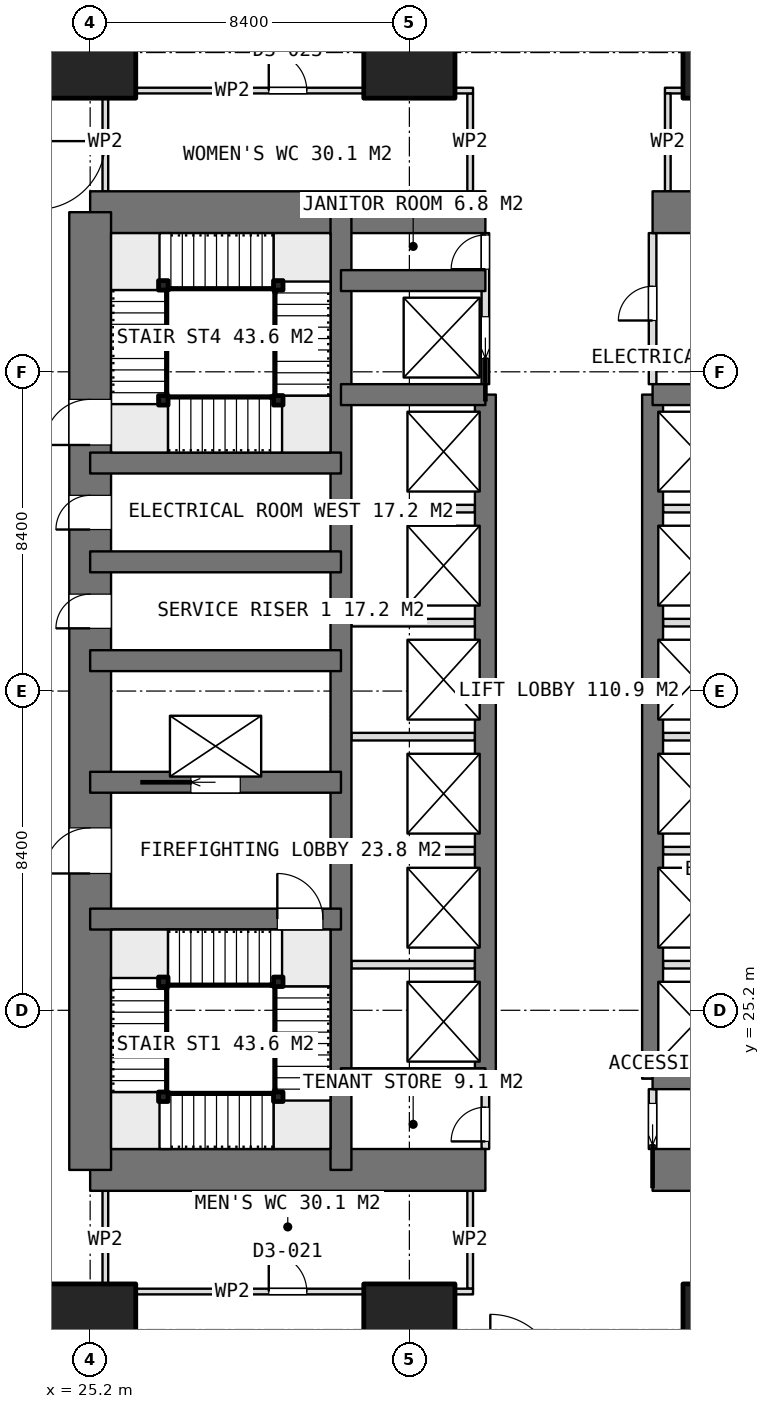
"""IFC4 building model, lengths in metres.
Left out: names, types, materials, properties, quantities, classifications, styles, units other than length and angle.
Written with IfcOpenShell. Run it as: python <this file> out.ifc"""

import sys

from ifc_helpers import new_model, si_unit, direction, frame, frame_2d, origin, origin_2d, place, context, subcontext, project, spatial, rectangle, extrude, element, fill, save


model = new_model("IFC4")
c1 = context("Model", 3, precision=1e-05, world=origin(), true_north=direction((0.0, 1.0)))
c2 = subcontext(c1, "Body", "Model", "MODEL_VIEW")
j1 = project(units=[si_unit("LENGTHUNIT", "METRE"), si_unit("PLANEANGLEUNIT", "RADIAN")], contexts=[c1])
p1 = place(None, origin())
s1 = spatial("IfcSite", under=j1, at=p1, CompositionType="ELEMENT")
p2 = place(p1, origin())
s2 = spatial("IfcBuilding", under=s1, at=p2, CompositionType="ELEMENT")
p3 = place(p2, frame((0.0, 0.0, 15.4)))
s3 = spatial("IfcBuildingStorey", under=s2, at=p3, CompositionType="ELEMENT", Elevation=15.4)
p4 = place(p3, frame((25.2, 21.0, 0.0), z_axis=(0.0, 0.0, 1.0), x_axis=(1.0, 0.0, 0.0)))
e1 = element("IfcWall", 1, at=p4, inside=s3, PredefinedType="SHEAR", context=c2, shape_type="SweptSolid", body=[
    extrude(rectangle(XDim=10.4, YDim=1.1, at=frame_2d((5.2, 0.0))), origin(), (0.0, 0.0, 1.0), 5.0),
])
p5 = place(p3, frame((40.0, 21.0, 0.0), z_axis=(0.0, 0.0, 1.0), x_axis=(1.0, 0.0, 0.0)))
e2 = element("IfcWall", 2, at=p5, inside=s3, PredefinedType="SHEAR", context=c2, shape_type="SweptSolid", body=[
    extrude(rectangle(XDim=10.4, YDim=1.1, at=frame_2d((5.2, 0.0))), origin(), (0.0, 0.0, 1.0), 5.0),
])
p6 = place(p3, frame((25.2, 46.2, 0.0), z_axis=(0.0, 0.0, 1.0), x_axis=(1.0, 0.0, 0.0)))
e3 = element("IfcWall", 3, at=p6, inside=s3, PredefinedType="SHEAR", context=c2, shape_type="SweptSolid", body=[
    extrude(rectangle(XDim=10.4, YDim=1.1, at=frame_2d((5.2, 0.0))), origin(), (0.0, 0.0, 1.0), 5.0),
])
p7 = place(p3, frame((40.0, 46.2, 0.0), z_axis=(0.0, 0.0, 1.0), x_axis=(1.0, 0.0, 0.0)))
e4 = element("IfcWall", 4, at=p7, inside=s3, PredefinedType="SHEAR", context=c2, shape_type="SweptSolid", body=[
    extrude(rectangle(XDim=10.4, YDim=1.1, at=frame_2d((5.2, 0.0))), origin(), (0.0, 0.0, 1.0), 5.0),
])
p8 = place(p3, frame((25.2, 21.0, 0.0), z_axis=(0.0, 0.0, 1.0), x_axis=(0.0, 1.0, 0.0)))
e5 = element("IfcWall", 5, at=p8, inside=s3, PredefinedType="SHEAR", context=c2, shape_type="SweptSolid", body=[
    extrude(rectangle(XDim=25.2, YDim=1.1, at=frame_2d((12.6, 0.0))), origin(), (0.0, 0.0, 1.0), 5.0),
])
p9 = place(p8, frame((7.8, 0.0, 0.0)))
e6 = element("IfcOpeningElement", 6, at=p9, cuts=e5, PredefinedType="OPENING", context=c2, shape_type="SweptSolid", body=[
    extrude(rectangle(XDim=1.2, YDim=2.1, at=frame_2d((0.6, 1.05))), frame((0.0, 0.56, 0.0), z_axis=(0.0, -1.0, 0.0), x_axis=(1.0, 0.0, 0.0)), (0.0, 0.0, 1.0), 1.12),
])
p10 = place(p8, frame((14.25, 0.0, 0.0)))
e7 = element("IfcOpeningElement", 7, at=p10, cuts=e5, PredefinedType="OPENING", context=c2, shape_type="SweptSolid", body=[
    extrude(rectangle(XDim=0.9, YDim=2.1, at=frame_2d((0.45, 1.05))), frame((0.0, 0.56, 0.0), z_axis=(0.0, -1.0, 0.0), x_axis=(1.0, 0.0, 0.0)), (0.0, 0.0, 1.0), 1.12),
])
p11 = place(p8, frame((16.85, 0.0, 0.0)))
e8 = element("IfcOpeningElement", 8, at=p11, cuts=e5, PredefinedType="OPENING", context=c2, shape_type="SweptSolid", body=[
    extrude(rectangle(XDim=0.9, YDim=2.1, at=frame_2d((0.45, 1.05))), frame((0.0, 0.56, 0.0), z_axis=(0.0, -1.0, 0.0), x_axis=(1.0, 0.0, 0.0)), (0.0, 0.0, 1.0), 1.12),
])
p12 = place(p8, frame((19.075, 0.0, 0.0)))
e9 = element("IfcOpeningElement", 9, at=p12, cuts=e5, PredefinedType="OPENING", context=c2, shape_type="SweptSolid", body=[
    extrude(rectangle(XDim=1.2, YDim=2.1, at=frame_2d((0.6, 1.05))), frame((0.0, 0.56, 0.0), z_axis=(0.0, -1.0, 0.0), x_axis=(1.0, 0.0, 0.0)), (0.0, 0.0, 1.0), 1.12),
])
p13 = place(p3, frame((31.8, 21.0, 0.0), z_axis=(0.0, 0.0, 1.0), x_axis=(0.0, 1.0, 0.0)))
e10 = element("IfcWall", 10, at=p13, inside=s3, PredefinedType="SHEAR", context=c2, shape_type="SweptSolid", body=[
    extrude(rectangle(XDim=25.2, YDim=0.55, at=frame_2d((12.6, 0.0))), origin(), (0.0, 0.0, 1.0), 5.0),
])
for number, where, z_axis, x_axis in (
    (11, (35.6, 23.4, 0.0), (0.0, 0.0, 1.0), (0.0, 1.0, 0.0)),
    (12, (40.0, 23.4, 0.0), (0.0, 0.0, 1.0), (0.0, 1.0, 0.0)),
):
    element("IfcWall", number, at=place(p3, frame(where, z_axis=z_axis, x_axis=x_axis)), inside=s3, PredefinedType="SHEAR", context=c2, shape_type="SweptSolid", body=[
        extrude(rectangle(XDim=18.0, YDim=0.55, at=frame_2d((9.0, 0.0))), origin(), (0.0, 0.0, 1.0), 5.0),
    ])
for number, where, z_axis, x_axis in (
    (13, (31.8, 23.4, 0.0), (0.0, 0.0, 1.0), (1.0, 0.0, 0.0)),
    (14, (31.8, 41.4, 0.0), (0.0, 0.0, 1.0), (1.0, 0.0, 0.0)),
    (15, (31.8, 44.4, 0.0), (0.0, 0.0, 1.0), (1.0, 0.0, 0.0)),
    (16, (40.0, 23.4, 0.0), (0.0, 0.0, 1.0), (1.0, 0.0, 0.0)),
    (17, (40.0, 41.4, 0.0), (0.0, 0.0, 1.0), (1.0, 0.0, 0.0)),
):
    element("IfcWall", number, at=place(p3, frame(where, z_axis=z_axis, x_axis=x_axis)), inside=s3, PredefinedType="SHEAR", context=c2, shape_type="SweptSolid", body=[
        extrude(rectangle(XDim=3.8, YDim=0.55, at=frame_2d((1.9, 0.0))), origin(), (0.0, 0.0, 1.0), 5.0),
    ])
p14 = place(p3, frame((25.2, 27.6, 0.0), z_axis=(0.0, 0.0, 1.0), x_axis=(1.0, 0.0, 0.0)))
e18 = element("IfcWall", 18, at=p14, inside=s3, PredefinedType="SHEAR", context=c2, shape_type="SweptSolid", body=[
    extrude(rectangle(XDim=6.6, YDim=0.55, at=frame_2d((3.3, 0.0))), origin(), (0.0, 0.0, 1.0), 5.0),
])
p15 = place(p14, frame((4.925, 0.0, 0.0)))
e19 = element("IfcOpeningElement", 19, at=p15, cuts=e18, PredefinedType="OPENING", context=c2, shape_type="SweptSolid", body=[
    extrude(rectangle(XDim=1.2, YDim=2.1, at=frame_2d((0.6, 1.05))), frame((0.0, 0.285, 0.0), z_axis=(0.0, -1.0, 0.0), x_axis=(1.0, 0.0, 0.0)), (0.0, 0.0, 1.0), 0.57),
])
p16 = place(p3, frame((25.2, 31.2, 0.0), z_axis=(0.0, 0.0, 1.0), x_axis=(1.0, 0.0, 0.0)))
e20 = element("IfcWall", 20, at=p16, inside=s3, PredefinedType="SHEAR", context=c2, shape_type="SweptSolid", body=[
    extrude(rectangle(XDim=6.6, YDim=0.55, at=frame_2d((3.3, 0.0))), origin(), (0.0, 0.0, 1.0), 5.0),
])
p17 = place(p16, frame((2.65, 0.0, 0.0)))
e21 = element("IfcOpeningElement", 21, at=p17, cuts=e20, PredefinedType="OPENING", context=c2, shape_type="SweptSolid", body=[
    extrude(rectangle(XDim=1.3, YDim=2.1, at=frame_2d((0.65, 1.05))), frame((0.0, 0.285, 0.0), z_axis=(0.0, -1.0, 0.0), x_axis=(1.0, 0.0, 0.0)), (0.0, 0.0, 1.0), 0.57),
])
for number, where, z_axis, x_axis in (
    (22, (25.2, 34.4, 0.0), (0.0, 0.0, 1.0), (1.0, 0.0, 0.0)),
    (23, (25.2, 37.0, 0.0), (0.0, 0.0, 1.0), (1.0, 0.0, 0.0)),
    (24, (25.2, 39.6, 0.0), (0.0, 0.0, 1.0), (1.0, 0.0, 0.0)),
):
    element("IfcWall", number, at=place(p3, frame(where, z_axis=z_axis, x_axis=x_axis)), inside=s3, PredefinedType="SHEAR", context=c2, shape_type="SweptSolid", body=[
        extrude(rectangle(XDim=6.6, YDim=0.55, at=frame_2d((3.3, 0.0))), origin(), (0.0, 0.0, 1.0), 5.0),
    ])
for number, where, z_axis, x_axis in (
    (25, (25.2, 16.8, 0.0), (0.0, 0.0, 1.0), (1.0, 0.0, 0.0)),
    (26, (25.2, 50.4, 0.0), (0.0, 0.0, 1.0), (1.0, 0.0, 0.0)),
    (27, (33.6, 16.8, 0.0), (0.0, 0.0, 1.0), (1.0, 0.0, 0.0)),
    (28, (33.6, 50.4, 0.0), (0.0, 0.0, 1.0), (1.0, 0.0, 0.0)),
    (29, (42.0, 16.8, 0.0), (0.0, 0.0, 1.0), (1.0, 0.0, 0.0)),
    (30, (42.0, 50.4, 0.0), (0.0, 0.0, 1.0), (1.0, 0.0, 0.0)),
):
    element("IfcColumn", number, at=place(p3, frame(where, z_axis=z_axis, x_axis=x_axis)), inside=s3, PredefinedType="COLUMN", context=c2, shape_type="SweptSolid", body=[
        extrude(rectangle(XDim=2.4, YDim=2.4, at=origin_2d()), origin(), (0.0, 0.0, 1.0), 5.0),
    ])
for number, where, z_axis, x_axis in (
    (31, (32.075, 26.4, 0.0), (0.0, 0.0, 1.0), (1.0, 0.0, 0.0)),
    (32, (32.075, 29.4, 0.0), (0.0, 0.0, 1.0), (1.0, 0.0, 0.0)),
    (33, (32.075, 32.4, 0.0), (0.0, 0.0, 1.0), (1.0, 0.0, 0.0)),
    (34, (32.075, 35.4, 0.0), (0.0, 0.0, 1.0), (1.0, 0.0, 0.0)),
    (35, (32.075, 38.4, 0.0), (0.0, 0.0, 1.0), (1.0, 0.0, 0.0)),
    (36, (40.275, 26.4, 0.0), (0.0, 0.0, 1.0), (1.0, 0.0, 0.0)),
    (37, (40.275, 29.4, 0.0), (0.0, 0.0, 1.0), (1.0, 0.0, 0.0)),
    (38, (40.275, 32.4, 0.0), (0.0, 0.0, 1.0), (1.0, 0.0, 0.0)),
    (39, (40.275, 35.4, 0.0), (0.0, 0.0, 1.0), (1.0, 0.0, 0.0)),
    (40, (40.275, 38.4, 0.0), (0.0, 0.0, 1.0), (1.0, 0.0, 0.0)),
):
    element("IfcWall", number, at=place(p3, frame(where, z_axis=z_axis, x_axis=x_axis)), inside=s3, PredefinedType="PARTITIONING", context=c2, shape_type="SweptSolid", body=[
        extrude(rectangle(XDim=3.25, YDim=0.2, at=frame_2d((1.625, 0.0))), origin(), (0.0, 0.0, 1.0), 4.7),
    ])
p18 = place(p3, frame((40.0, 21.55, 0.0), z_axis=(0.0, 0.0, 1.0), x_axis=(0.0, 1.0, 0.0)))
e41 = element("IfcWall", 41, at=p18, inside=s3, PredefinedType="PARTITIONING", context=c2, shape_type="SweptSolid", body=[
    extrude(rectangle(XDim=1.575, YDim=0.2, at=frame_2d((0.788, 0.0))), origin(), (0.0, 0.0, 1.0), 4.7),
])
p19 = place(p18, frame((0.1, 0.0, 0.0)))
e42 = element("IfcOpeningElement", 42, at=p19, cuts=e41, PredefinedType="OPENING", context=c2, shape_type="SweptSolid", body=[
    extrude(rectangle(XDim=1.1, YDim=2.1, at=frame_2d((0.55, 1.05))), frame((0.0, 0.11, 0.0), z_axis=(0.0, -1.0, 0.0), x_axis=(1.0, 0.0, 0.0)), (0.0, 0.0, 1.0), 0.22),
])
p20 = place(p3, frame((40.0, 41.675, 0.0), z_axis=(0.0, 0.0, 1.0), x_axis=(0.0, 1.0, 0.0)))
e43 = element("IfcWall", 43, at=p20, inside=s3, PredefinedType="PARTITIONING", context=c2, shape_type="SweptSolid", body=[
    extrude(rectangle(XDim=3.975, YDim=0.2, at=frame_2d((1.987, 0.0))), origin(), (0.0, 0.0, 1.0), 4.7),
])
p21 = place(p20, frame((1.675, 0.0, 0.0)))
e44 = element("IfcOpeningElement", 44, at=p21, cuts=e43, PredefinedType="OPENING", context=c2, shape_type="SweptSolid", body=[
    extrude(rectangle(XDim=0.9, YDim=2.1, at=frame_2d((0.45, 1.05))), frame((0.0, 0.11, 0.0), z_axis=(0.0, -1.0, 0.0), x_axis=(1.0, 0.0, 0.0)), (0.0, 0.0, 1.0), 0.22),
])
p22 = place(p3, frame((35.6, 41.675, 0.0), z_axis=(0.0, 0.0, 1.0), x_axis=(0.0, 1.0, 0.0)))
e45 = element("IfcWall", 45, at=p22, inside=s3, PredefinedType="PARTITIONING", context=c2, shape_type="SweptSolid", body=[
    extrude(rectangle(XDim=3.975, YDim=0.2, at=frame_2d((1.987, 0.0))), origin(), (0.0, 0.0, 1.0), 4.7),
])
p23 = place(p22, frame((3.025, 0.0, 0.0)))
e46 = element("IfcOpeningElement", 46, at=p23, cuts=e45, PredefinedType="OPENING", context=c2, shape_type="SweptSolid", body=[
    extrude(rectangle(XDim=0.9, YDim=2.1, at=frame_2d((0.45, 1.05))), frame((0.0, 0.11, 0.0), z_axis=(0.0, -1.0, 0.0), x_axis=(1.0, 0.0, 0.0)), (0.0, 0.0, 1.0), 0.22),
])
p24 = place(p22, frame((0.675, 0.0, 0.0)))
e47 = element("IfcOpeningElement", 47, at=p24, cuts=e45, PredefinedType="OPENING", context=c2, shape_type="SweptSolid", body=[
    extrude(rectangle(XDim=1.1, YDim=2.1, at=frame_2d((0.55, 1.05))), frame((0.0, 0.11, 0.0), z_axis=(0.0, -1.0, 0.0), x_axis=(1.0, 0.0, 0.0)), (0.0, 0.0, 1.0), 0.22),
])
p25 = place(p3, frame((35.6, 21.55, 0.0), z_axis=(0.0, 0.0, 1.0), x_axis=(0.0, 1.0, 0.0)))
e48 = element("IfcWall", 48, at=p25, inside=s3, PredefinedType="PARTITIONING", context=c2, shape_type="SweptSolid", body=[
    extrude(rectangle(XDim=1.575, YDim=0.2, at=frame_2d((0.788, 0.0))), origin(), (0.0, 0.0, 1.0), 4.7),
])
p26 = place(p25, frame((0.2, 0.0, 0.0)))
e49 = element("IfcOpeningElement", 49, at=p26, cuts=e48, PredefinedType="OPENING", context=c2, shape_type="SweptSolid", body=[
    extrude(rectangle(XDim=0.9, YDim=2.1, at=frame_2d((0.45, 1.05))), frame((0.0, 0.11, 0.0), z_axis=(0.0, -1.0, 0.0), x_axis=(1.0, 0.0, 0.0)), (0.0, 0.0, 1.0), 0.22),
])
p27 = place(p3, frame((40.325, 49.4, 0.0), z_axis=(0.0, 0.0, 1.0), x_axis=(1.0, 0.0, 0.0)))
e50 = element("IfcWall", 50, at=p27, inside=s3, PredefinedType="PARTITIONING", context=c2, shape_type="SweptSolid", body=[
    extrude(rectangle(XDim=9.75, YDim=0.15, at=frame_2d((4.875, 0.0))), origin(), (0.0, 0.0, 1.0), 4.7),
])
p28 = place(p27, frame((4.375, 0.0, 0.0)))
e51 = element("IfcOpeningElement", 51, at=p28, cuts=e50, PredefinedType="OPENING", context=c2, shape_type="SweptSolid", body=[
    extrude(rectangle(XDim=1.0, YDim=2.1, at=frame_2d((0.5, 1.05))), frame((0.0, 0.085, 0.0), z_axis=(0.0, -1.0, 0.0), x_axis=(1.0, 0.0, 0.0)), (0.0, 0.0, 1.0), 0.17),
])
p29 = place(p3, frame((40.4, 46.75, 0.0), z_axis=(0.0, 0.0, 1.0), x_axis=(0.0, 1.0, 0.0)))
e52 = element("IfcWall", 52, at=p29, inside=s3, PredefinedType="PARTITIONING", context=c2, shape_type="SweptSolid", body=[
    extrude(rectangle(XDim=2.575, YDim=0.15, at=frame_2d((1.288, 0.0))), origin(), (0.0, 0.0, 1.0), 4.7),
])
p30 = place(p3, frame((25.525, 49.4, 0.0), z_axis=(0.0, 0.0, 1.0), x_axis=(1.0, 0.0, 0.0)))
e53 = element("IfcWall", 53, at=p30, inside=s3, PredefinedType="PARTITIONING", context=c2, shape_type="SweptSolid", body=[
    extrude(rectangle(XDim=9.75, YDim=0.15, at=frame_2d((4.875, 0.0))), origin(), (0.0, 0.0, 1.0), 4.7),
])
p31 = place(p30, frame((4.375, 0.0, 0.0)))
e54 = element("IfcOpeningElement", 54, at=p31, cuts=e53, PredefinedType="OPENING", context=c2, shape_type="SweptSolid", body=[
    extrude(rectangle(XDim=1.0, YDim=2.1, at=frame_2d((0.5, 1.05))), frame((0.0, 0.085, 0.0), z_axis=(0.0, -1.0, 0.0), x_axis=(1.0, 0.0, 0.0)), (0.0, 0.0, 1.0), 0.17),
])
for number, where, z_axis, x_axis in (
    (55, (25.6, 46.75, 0.0), (0.0, 0.0, 1.0), (0.0, 1.0, 0.0)),
    (56, (35.2, 46.75, 0.0), (0.0, 0.0, 1.0), (0.0, 1.0, 0.0)),
):
    element("IfcWall", number, at=place(p3, frame(where, z_axis=z_axis, x_axis=x_axis)), inside=s3, PredefinedType="PARTITIONING", context=c2, shape_type="SweptSolid", body=[
        extrude(rectangle(XDim=2.575, YDim=0.15, at=frame_2d((1.288, 0.0))), origin(), (0.0, 0.0, 1.0), 4.7),
    ])
p32 = place(p3, frame((25.525, 17.8, 0.0), z_axis=(0.0, 0.0, 1.0), x_axis=(1.0, 0.0, 0.0)))
e57 = element("IfcWall", 57, at=p32, inside=s3, PredefinedType="PARTITIONING", context=c2, shape_type="SweptSolid", body=[
    extrude(rectangle(XDim=9.75, YDim=0.15, at=frame_2d((4.875, 0.0))), origin(), (0.0, 0.0, 1.0), 4.7),
])
p33 = place(p32, frame((4.375, 0.0, 0.0)))
e58 = element("IfcOpeningElement", 58, at=p33, cuts=e57, PredefinedType="OPENING", context=c2, shape_type="SweptSolid", body=[
    extrude(rectangle(XDim=1.0, YDim=2.1, at=frame_2d((0.5, 1.05))), frame((0.0, 0.085, 0.0), z_axis=(0.0, -1.0, 0.0), x_axis=(1.0, 0.0, 0.0)), (0.0, 0.0, 1.0), 0.17),
])
for number, where, z_axis, x_axis in (
    (59, (25.6, 17.875, 0.0), (0.0, 0.0, 1.0), (0.0, 1.0, 0.0)),
    (60, (35.2, 17.875, 0.0), (0.0, 0.0, 1.0), (0.0, 1.0, 0.0)),
):
    element("IfcWall", number, at=place(p3, frame(where, z_axis=z_axis, x_axis=x_axis)), inside=s3, PredefinedType="PARTITIONING", context=c2, shape_type="SweptSolid", body=[
        extrude(rectangle(XDim=2.575, YDim=0.15, at=frame_2d((1.288, 0.0))), origin(), (0.0, 0.0, 1.0), 4.7),
    ])
for number, where, z_axis, x_axis in (
    (61, (30.15, 25.95, 0.0), (0.0, 0.0, 1.0), (1.0, 0.0, 0.0)),
    (62, (30.15, 22.925, 0.0), (0.0, 0.0, 1.0), (1.0, 0.0, 0.0)),
    (63, (27.125, 22.925, 0.0), (0.0, 0.0, 1.0), (1.0, 0.0, 0.0)),
    (64, (27.125, 25.95, 0.0), (0.0, 0.0, 1.0), (1.0, 0.0, 0.0)),
    (65, (27.125, 41.25, 0.0), (0.0, 0.0, 1.0), (1.0, 0.0, 0.0)),
    (66, (30.15, 41.25, 0.0), (0.0, 0.0, 1.0), (1.0, 0.0, 0.0)),
    (67, (30.15, 44.275, 0.0), (0.0, 0.0, 1.0), (1.0, 0.0, 0.0)),
    (68, (27.125, 44.275, 0.0), (0.0, 0.0, 1.0), (1.0, 0.0, 0.0)),
):
    element("IfcColumn", number, at=place(p3, frame(where, z_axis=z_axis, x_axis=x_axis)), inside=s3, PredefinedType="COLUMN", context=c2, shape_type="SweptSolid", body=[
        extrude(rectangle(XDim=0.25, YDim=0.25, at=origin_2d()), origin(), (0.0, 0.0, 1.0), 5.0),
    ])
p34 = place(p9, origin())
e69 = element("IfcDoor", 69, at=p34, inside=s3, OperationType="SINGLE_SWING_LEFT", PredefinedType="DOOR", context=c2, shape_type="SweptSolid", body=[
    extrude(rectangle(XDim=1.2, YDim=2.1, at=frame_2d((0.6, 1.05))), frame((0.0, 0.025, 0.0), z_axis=(0.0, -1.0, 0.0), x_axis=(1.0, 0.0, 0.0)), (0.0, 0.0, 1.0), 0.05),
])
fill(e6, e69)
p35 = place(p10, origin())
e70 = element("IfcDoor", 70, at=p35, inside=s3, OperationType="SINGLE_SWING_LEFT", PredefinedType="DOOR", context=c2, shape_type="SweptSolid", body=[
    extrude(rectangle(XDim=0.9, YDim=2.1, at=frame_2d((0.45, 1.05))), frame((0.0, 0.025, 0.0), z_axis=(0.0, -1.0, 0.0), x_axis=(1.0, 0.0, 0.0)), (0.0, 0.0, 1.0), 0.05),
])
fill(e7, e70)
p36 = place(p11, origin())
e71 = element("IfcDoor", 71, at=p36, inside=s3, OperationType="SINGLE_SWING_LEFT", PredefinedType="DOOR", context=c2, shape_type="SweptSolid", body=[
    extrude(rectangle(XDim=0.9, YDim=2.1, at=frame_2d((0.45, 1.05))), frame((0.0, 0.025, 0.0), z_axis=(0.0, -1.0, 0.0), x_axis=(1.0, 0.0, 0.0)), (0.0, 0.0, 1.0), 0.05),
])
fill(e8, e71)
p37 = place(p19, origin())
e72 = element("IfcDoor", 72, at=p37, inside=s3, OperationType="SLIDING_TO_LEFT", PredefinedType="DOOR", context=c2, shape_type="SweptSolid", body=[
    extrude(rectangle(XDim=1.1, YDim=2.1, at=frame_2d((0.55, 1.05))), frame((0.0, 0.025, 0.0), z_axis=(0.0, -1.0, 0.0), x_axis=(1.0, 0.0, 0.0)), (0.0, 0.0, 1.0), 0.05),
])
fill(e42, e72)
p38 = place(p26, origin())
e73 = element("IfcDoor", 73, at=p38, inside=s3, OperationType="SINGLE_SWING_LEFT", PredefinedType="DOOR", context=c2, shape_type="SweptSolid", body=[
    extrude(rectangle(XDim=0.9, YDim=2.1, at=frame_2d((0.45, 1.05))), frame((0.0, 0.025, 0.0), z_axis=(0.0, -1.0, 0.0), x_axis=(1.0, 0.0, 0.0)), (0.0, 0.0, 1.0), 0.05),
])
fill(e49, e73)
p39 = place(p21, origin())
e74 = element("IfcDoor", 74, at=p39, inside=s3, OperationType="SINGLE_SWING_LEFT", PredefinedType="DOOR", context=c2, shape_type="SweptSolid", body=[
    extrude(rectangle(XDim=0.9, YDim=2.1, at=frame_2d((0.45, 1.05))), frame((0.0, 0.025, 0.0), z_axis=(0.0, -1.0, 0.0), x_axis=(1.0, 0.0, 0.0)), (0.0, 0.0, 1.0), 0.05),
])
fill(e44, e74)
p40 = place(p23, origin())
e75 = element("IfcDoor", 75, at=p40, inside=s3, OperationType="SINGLE_SWING_LEFT", PredefinedType="DOOR", context=c2, shape_type="SweptSolid", body=[
    extrude(rectangle(XDim=0.9, YDim=2.1, at=frame_2d((0.45, 1.05))), frame((0.0, 0.025, 0.0), z_axis=(0.0, -1.0, 0.0), x_axis=(1.0, 0.0, 0.0)), (0.0, 0.0, 1.0), 0.05),
])
fill(e46, e75)
p41 = place(p17, origin())
e76 = element("IfcDoor", 76, at=p41, inside=s3, OperationType="SLIDING_TO_LEFT", PredefinedType="USERDEFINED", context=c2, shape_type="SweptSolid", body=[
    extrude(rectangle(XDim=1.3, YDim=2.1, at=frame_2d((0.65, 1.05))), frame((0.0, 0.025, 0.0), z_axis=(0.0, -1.0, 0.0), x_axis=(1.0, 0.0, 0.0)), (0.0, 0.0, 1.0), 0.05),
])
fill(e21, e76)
p42 = place(p24, origin())
e77 = element("IfcDoor", 77, at=p42, inside=s3, OperationType="SLIDING_TO_LEFT", PredefinedType="USERDEFINED", context=c2, shape_type="SweptSolid", body=[
    extrude(rectangle(XDim=1.1, YDim=2.1, at=frame_2d((0.55, 1.05))), frame((0.0, 0.025, 0.0), z_axis=(0.0, -1.0, 0.0), x_axis=(1.0, 0.0, 0.0)), (0.0, 0.0, 1.0), 0.05),
])
fill(e47, e77)
p43 = place(p31, origin())
e78 = element("IfcDoor", 78, at=p43, inside=s3, OperationType="SINGLE_SWING_LEFT", PredefinedType="DOOR", context=c2, shape_type="SweptSolid", body=[
    extrude(rectangle(XDim=1.0, YDim=2.1, at=frame_2d((0.5, 1.05))), frame((0.0, 0.025, 0.0), z_axis=(0.0, -1.0, 0.0), x_axis=(1.0, 0.0, 0.0)), (0.0, 0.0, 1.0), 0.05),
])
fill(e54, e78)
p44 = place(p33, origin())
e79 = element("IfcDoor", 79, at=p44, inside=s3, OperationType="SINGLE_SWING_LEFT", PredefinedType="DOOR", context=c2, shape_type="SweptSolid", body=[
    extrude(rectangle(XDim=1.0, YDim=2.1, at=frame_2d((0.5, 1.05))), frame((0.0, 0.025, 0.0), z_axis=(0.0, -1.0, 0.0), x_axis=(1.0, 0.0, 0.0)), (0.0, 0.0, 1.0), 0.05),
])
fill(e58, e79)
p45 = place(p15, origin())
e80 = element("IfcDoor", 80, at=p45, inside=s3, OperationType="SINGLE_SWING_RIGHT", PredefinedType="DOOR", context=c2, shape_type="SweptSolid", body=[
    extrude(rectangle(XDim=1.2, YDim=2.1, at=frame_2d((0.6, 1.05))), frame((0.0, 0.025, 0.0), z_axis=(0.0, -1.0, 0.0), x_axis=(1.0, 0.0, 0.0)), (0.0, 0.0, 1.0), 0.05),
])
fill(e19, e80)
p46 = place(p12, origin())
e81 = element("IfcDoor", 81, at=p46, inside=s3, OperationType="SINGLE_SWING_RIGHT", PredefinedType="DOOR", context=c2, shape_type="SweptSolid", body=[
    extrude(rectangle(XDim=1.2, YDim=2.1, at=frame_2d((0.6, 1.05))), frame((0.0, 0.025, 0.0), z_axis=(0.0, -1.0, 0.0), x_axis=(1.0, 0.0, 0.0)), (0.0, 0.0, 1.0), 0.05),
])
fill(e9, e81)
save(model, sys.argv[1])
